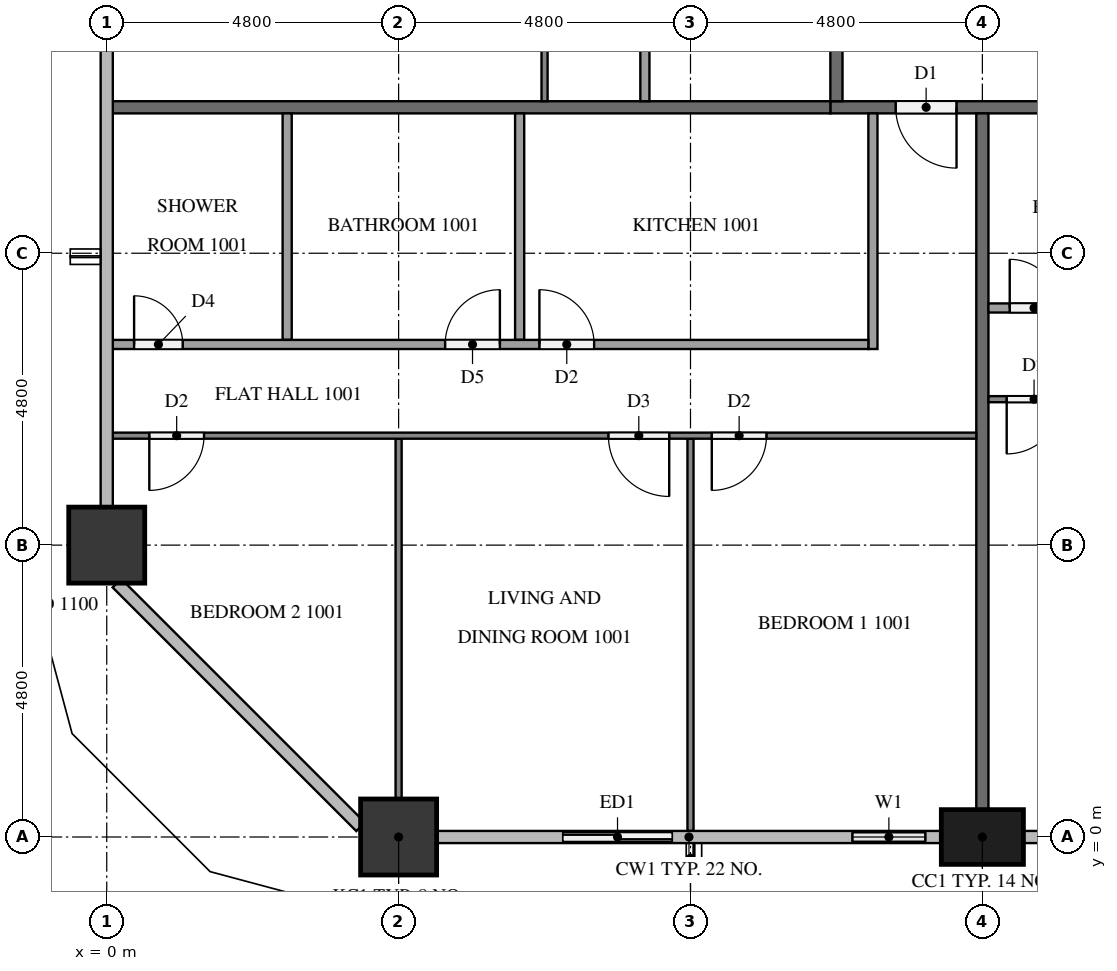
"""IFC4 building model, lengths in metres.
Left out: names, types, materials, properties, quantities, classifications, styles, units other than length and angle.
Written with IfcOpenShell. Run it as: python <this file> out.ifc"""

import sys

from ifc_helpers import new_model, si_unit, direction, frame, frame_2d, origin, origin_2d, place, context, subcontext, project, spatial, rectangle, extrude, element, fill, save


model = new_model("IFC4")
c1 = context("Model", 3, precision=1e-05, world=origin(), true_north=direction((0.0, 1.0)))
c2 = subcontext(c1, "Body", "Model", "MODEL_VIEW")
j1 = project(units=[si_unit("LENGTHUNIT", "METRE"), si_unit("PLANEANGLEUNIT", "RADIAN")], contexts=[c1])
p1 = place(None, origin())
s1 = spatial("IfcSite", under=j1, at=p1, CompositionType="ELEMENT")
p2 = place(p1, origin())
s2 = spatial("IfcBuilding", under=s1, at=p2, CompositionType="ELEMENT")
p3 = place(p2, frame((0.0, 0.0, 43.4)))
s3 = spatial("IfcBuildingStorey", under=s2, at=p3, CompositionType="ELEMENT", Elevation=43.4)
p4 = place(p3, frame((4.8, 0.0, 0.0), z_axis=(0.0, 0.0, 1.0), x_axis=(1.0, 0.0, 0.0)))
e1 = element("IfcColumn", 1, at=p4, inside=s3, PredefinedType="COLUMN", context=c2, shape_type="SweptSolid", body=[
    extrude(rectangle(XDim=1.25, YDim=1.25, at=origin_2d()), origin(), (0.0, 0.0, 1.0), 3.2),
])
p5 = place(p3, frame((14.4, 0.0, 0.0), z_axis=(0.0, 0.0, 1.0), x_axis=(1.0, 0.0, 0.0)))
e2 = element("IfcColumn", 2, at=p5, inside=s3, PredefinedType="COLUMN", context=c2, shape_type="SweptSolid", body=[
    extrude(rectangle(XDim=1.35, YDim=0.9, at=origin_2d()), origin(), (0.0, 0.0, 1.0), 3.2),
])
p6 = place(p3, frame((0.0, 4.8, 0.0), z_axis=(0.0, 0.0, 1.0), x_axis=(1.0, 0.0, 0.0)))
e3 = element("IfcColumn", 3, at=p6, inside=s3, PredefinedType="COLUMN", context=c2, shape_type="SweptSolid", body=[
    extrude(rectangle(XDim=1.25, YDim=1.25, at=origin_2d()), origin(), (0.0, 0.0, 1.0), 3.2),
])
p7 = place(p3, frame((7.2, 0.0, 0.0), z_axis=(0.0, 0.0, 1.0), x_axis=(1.0, 0.0, 0.0)))
e4 = element("IfcWall", 4, at=p7, inside=s3, PredefinedType="SOLIDWALL", context=c2, shape_type="SweptSolid", body=[
    extrude(rectangle(XDim=2.4, YDim=0.15, at=frame_2d((1.2, 0.0))), origin(), (0.0, 0.0, 1.0), 3.2),
])
p8 = place(p7, frame((0.3, 0.0, 0.0)))
e5 = element("IfcOpeningElement", 5, at=p8, cuts=e4, PredefinedType="OPENING", context=c2, shape_type="SweptSolid", body=[
    extrude(rectangle(XDim=1.8, YDim=2.4, at=frame_2d((0.9, 1.2))), frame((0.0, 0.085, 0.0), z_axis=(0.0, -1.0, 0.0), x_axis=(1.0, 0.0, 0.0)), (0.0, 0.0, 1.0), 0.17),
])
p9 = place(p3, frame((12.0, 0.0, 0.0), z_axis=(0.0, 0.0, 1.0), x_axis=(1.0, 0.0, 0.0)))
e6 = element("IfcWall", 6, at=p9, inside=s3, PredefinedType="SOLIDWALL", context=c2, shape_type="SweptSolid", body=[
    extrude(rectangle(XDim=1.725, YDim=0.15, at=frame_2d((0.863, 0.0))), origin(), (0.0, 0.0, 1.0), 3.2),
])
p10 = place(p9, frame((0.262, 0.0, 0.9)))
e7 = element("IfcOpeningElement", 7, at=p10, cuts=e6, PredefinedType="OPENING", context=c2, shape_type="SweptSolid", body=[
    extrude(rectangle(XDim=1.2, YDim=1.4, at=frame_2d((0.6, 0.7))), frame((0.0, 0.085, 0.0), z_axis=(0.0, -1.0, 0.0), x_axis=(1.0, 0.0, 0.0)), (0.0, 0.0, 1.0), 0.17),
])
p11 = place(p3, frame((15.075, 0.0, 0.0), z_axis=(0.0, 0.0, 1.0), x_axis=(1.0, 0.0, 0.0)))
e8 = element("IfcWall", 8, at=p11, inside=s3, PredefinedType="SOLIDWALL", context=c2, shape_type="SweptSolid", body=[
    extrude(rectangle(XDim=1.725, YDim=0.15, at=frame_2d((0.863, 0.0))), origin(), (0.0, 0.0, 1.0), 3.2),
])
p12 = place(p11, frame((0.262, 0.0, 0.9)))
e9 = element("IfcOpeningElement", 9, at=p12, cuts=e8, PredefinedType="OPENING", context=c2, shape_type="SweptSolid", body=[
    extrude(rectangle(XDim=1.2, YDim=1.4, at=frame_2d((0.6, 0.7))), frame((0.0, 0.085, 0.0), z_axis=(0.0, -1.0, 0.0), x_axis=(1.0, 0.0, 0.0)), (0.0, 0.0, 1.0), 0.17),
])
p13 = place(p3, frame((50.5, 12.0, 0.0), z_axis=(0.0, 0.0, 1.0), x_axis=(-1.0, 0.0, 0.0)))
e10 = element("IfcWall", 10, at=p13, inside=s3, PredefinedType="PARTITIONING", context=c2, shape_type="SweptSolid", body=[
    extrude(rectangle(XDim=38.6, YDim=0.2, at=frame_2d((19.3, 0.0))), origin(), (0.0, 0.0, 1.0), 3.2),
])
p14 = place(p13, frame((36.525, 0.0, 0.0)))
e11 = element("IfcOpeningElement", 11, at=p14, cuts=e10, PredefinedType="OPENING", context=c2, shape_type="SweptSolid", body=[
    extrude(rectangle(XDim=1.0, YDim=2.1, at=frame_2d((0.5, 1.05))), frame((0.0, 0.11, 0.0), z_axis=(0.0, -1.0, 0.0), x_axis=(1.0, 0.0, 0.0)), (0.0, 0.0, 1.0), 0.22),
])
p15 = place(p13, frame((24.525, 0.0, 0.0)))
e12 = element("IfcOpeningElement", 12, at=p15, cuts=e10, PredefinedType="OPENING", context=c2, shape_type="SweptSolid", body=[
    extrude(rectangle(XDim=1.0, YDim=2.1, at=frame_2d((0.5, 1.05))), frame((0.0, 0.11, 0.0), z_axis=(0.0, -1.0, 0.0), x_axis=(1.0, 0.0, 0.0)), (0.0, 0.0, 1.0), 0.22),
])
p16 = place(p13, frame((22.675, 0.0, 0.0)))
e13 = element("IfcOpeningElement", 13, at=p16, cuts=e10, PredefinedType="OPENING", context=c2, shape_type="SweptSolid", body=[
    extrude(rectangle(XDim=1.0, YDim=2.1, at=frame_2d((0.5, 1.05))), frame((0.0, 0.11, 0.0), z_axis=(0.0, -1.0, 0.0), x_axis=(1.0, 0.0, 0.0)), (0.0, 0.0, 1.0), 0.22),
])
p17 = place(p13, frame((8.275, 0.0, 0.0)))
e14 = element("IfcOpeningElement", 14, at=p17, cuts=e10, PredefinedType="OPENING", context=c2, shape_type="SweptSolid", body=[
    extrude(rectangle(XDim=1.0, YDim=2.1, at=frame_2d((0.5, 1.05))), frame((0.0, 0.11, 0.0), z_axis=(0.0, -1.0, 0.0), x_axis=(1.0, 0.0, 0.0)), (0.0, 0.0, 1.0), 0.22),
])
p18 = place(p3, frame((12.0, 12.1, 0.0), z_axis=(0.0, 0.0, 1.0), x_axis=(0.0, 1.0, 0.0)))
e15 = element("IfcWall", 15, at=p18, inside=s3, PredefinedType="PARTITIONING", context=c2, shape_type="SweptSolid", body=[
    extrude(rectangle(XDim=28.6, YDim=0.2, at=frame_2d((14.3, 0.0))), origin(), (0.0, 0.0, 1.0), 3.2),
])
p19 = place(p18, frame((26.725, 0.0, 0.0)))
e16 = element("IfcOpeningElement", 16, at=p19, cuts=e15, PredefinedType="OPENING", context=c2, shape_type="SweptSolid", body=[
    extrude(rectangle(XDim=1.0, YDim=2.1, at=frame_2d((0.5, 1.05))), frame((0.0, 0.11, 0.0), z_axis=(0.0, -1.0, 0.0), x_axis=(1.0, 0.0, 0.0)), (0.0, 0.0, 1.0), 0.22),
])
p20 = place(p18, frame((17.125, 0.0, 0.0)))
e17 = element("IfcOpeningElement", 17, at=p20, cuts=e15, PredefinedType="OPENING", context=c2, shape_type="SweptSolid", body=[
    extrude(rectangle(XDim=1.0, YDim=2.1, at=frame_2d((0.5, 1.05))), frame((0.0, 0.11, 0.0), z_axis=(0.0, -1.0, 0.0), x_axis=(1.0, 0.0, 0.0)), (0.0, 0.0, 1.0), 0.22),
])
p21 = place(p18, frame((15.275, 0.0, 0.0)))
e18 = element("IfcOpeningElement", 18, at=p21, cuts=e15, PredefinedType="OPENING", context=c2, shape_type="SweptSolid", body=[
    extrude(rectangle(XDim=1.0, YDim=2.1, at=frame_2d((0.5, 1.05))), frame((0.0, 0.11, 0.0), z_axis=(0.0, -1.0, 0.0), x_axis=(1.0, 0.0, 0.0)), (0.0, 0.0, 1.0), 0.22),
])
p22 = place(p18, frame((5.675, 0.0, 0.0)))
e19 = element("IfcOpeningElement", 19, at=p22, cuts=e15, PredefinedType="OPENING", context=c2, shape_type="SweptSolid", body=[
    extrude(rectangle(XDim=1.0, YDim=2.1, at=frame_2d((0.5, 1.05))), frame((0.0, 0.11, 0.0), z_axis=(0.0, -1.0, 0.0), x_axis=(1.0, 0.0, 0.0)), (0.0, 0.0, 1.0), 0.22),
])
p23 = place(p3, frame((14.4, 11.9, 0.0), z_axis=(0.0, 0.0, 1.0), x_axis=(0.0, -1.0, 0.0)))
e20 = element("IfcWall", 20, at=p23, inside=s3, PredefinedType="PARTITIONING", context=c2, shape_type="SweptSolid", body=[
    extrude(rectangle(XDim=11.45, YDim=0.2, at=frame_2d((5.725, 0.0))), origin(), (0.0, 0.0, 1.0), 3.2),
])
p24 = place(p3, frame((0.1, 12.0, 0.0), z_axis=(0.0, 0.0, 1.0), x_axis=(1.0, 0.0, 0.0)))
e21 = element("IfcWall", 21, at=p24, inside=s3, PredefinedType="PARTITIONING", context=c2, shape_type="SweptSolid", body=[
    extrude(rectangle(XDim=11.8, YDim=0.2, at=frame_2d((5.9, 0.0))), origin(), (0.0, 0.0, 1.0), 3.2),
])
p25 = place(p3, frame((9.6, 6.55, 0.0), z_axis=(0.0, 0.0, 1.0), x_axis=(0.0, -1.0, 0.0)))
e22 = element("IfcWall", 22, at=p25, inside=s3, PredefinedType="PARTITIONING", context=c2, shape_type="SweptSolid", body=[
    extrude(rectangle(XDim=6.45, YDim=0.1, at=frame_2d((3.225, 0.0))), origin(), (0.0, 0.0, 1.0), 3.2),
])
p26 = place(p3, frame((4.8, 6.55, 0.0), z_axis=(0.0, 0.0, 1.0), x_axis=(0.0, -1.0, 0.0)))
e23 = element("IfcWall", 23, at=p26, inside=s3, PredefinedType="PARTITIONING", context=c2, shape_type="SweptSolid", body=[
    extrude(rectangle(XDim=5.925, YDim=0.1, at=frame_2d((2.962, 0.0))), origin(), (0.0, 0.0, 1.0), 3.2),
])
p27 = place(p3, frame((14.3, 6.6, 0.0), z_axis=(0.0, 0.0, 1.0), x_axis=(-1.0, 0.0, 0.0)))
e24 = element("IfcWall", 24, at=p27, inside=s3, PredefinedType="PARTITIONING", context=c2, shape_type="SweptSolid", body=[
    extrude(rectangle(XDim=14.2, YDim=0.1, at=frame_2d((7.1, 0.0))), origin(), (0.0, 0.0, 1.0), 3.2),
])
p28 = place(p27, frame((3.45, 0.0, 0.0)))
e25 = element("IfcOpeningElement", 25, at=p28, cuts=e24, PredefinedType="OPENING", context=c2, shape_type="SweptSolid", body=[
    extrude(rectangle(XDim=0.9, YDim=2.1, at=frame_2d((0.45, 1.05))), frame((0.0, 0.06, 0.0), z_axis=(0.0, -1.0, 0.0), x_axis=(1.0, 0.0, 0.0)), (0.0, 0.0, 1.0), 0.12),
])
p29 = place(p27, frame((5.05, 0.0, 0.0)))
e26 = element("IfcOpeningElement", 26, at=p29, cuts=e24, PredefinedType="OPENING", context=c2, shape_type="SweptSolid", body=[
    extrude(rectangle(XDim=1.0, YDim=2.1, at=frame_2d((0.5, 1.05))), frame((0.0, 0.06, 0.0), z_axis=(0.0, -1.0, 0.0), x_axis=(1.0, 0.0, 0.0)), (0.0, 0.0, 1.0), 0.12),
])
p30 = place(p27, frame((12.7, 0.0, 0.0)))
e27 = element("IfcOpeningElement", 27, at=p30, cuts=e24, PredefinedType="OPENING", context=c2, shape_type="SweptSolid", body=[
    extrude(rectangle(XDim=0.9, YDim=2.1, at=frame_2d((0.45, 1.05))), frame((0.0, 0.06, 0.0), z_axis=(0.0, -1.0, 0.0), x_axis=(1.0, 0.0, 0.0)), (0.0, 0.0, 1.0), 0.12),
])
for number, where, z_axis, x_axis in (
    (28, (6.79, 11.9, 0.0), (0.0, 0.0, 1.0), (0.0, -1.0, 0.0)),
    (29, (2.967, 11.9, 0.0), (0.0, 0.0, 1.0), (0.0, -1.0, 0.0)),
):
    element("IfcWall", number, at=place(p3, frame(where, z_axis=z_axis, x_axis=x_axis)), inside=s3, PredefinedType="PARTITIONING", context=c2, shape_type="SweptSolid", body=[
        extrude(rectangle(XDim=3.725, YDim=0.15, at=frame_2d((1.862, 0.0))), origin(), (0.0, 0.0, 1.0), 3.2),
    ])
p31 = place(p3, frame((12.6, 11.9, 0.0), z_axis=(0.0, 0.0, 1.0), x_axis=(0.0, -1.0, 0.0)))
e30 = element("IfcWall", 30, at=p31, inside=s3, PredefinedType="PARTITIONING", context=c2, shape_type="SweptSolid", body=[
    extrude(rectangle(XDim=3.875, YDim=0.15, at=frame_2d((1.938, 0.0))), origin(), (0.0, 0.0, 1.0), 3.2),
])
p32 = place(p3, frame((0.1, 8.1, 0.0), z_axis=(0.0, 0.0, 1.0), x_axis=(1.0, 0.0, 0.0)))
e31 = element("IfcWall", 31, at=p32, inside=s3, PredefinedType="PARTITIONING", context=c2, shape_type="SweptSolid", body=[
    extrude(rectangle(XDim=12.425, YDim=0.15, at=frame_2d((6.212, 0.0))), origin(), (0.0, 0.0, 1.0), 3.2),
])
p33 = place(p32, frame((7.015, 0.0, 0.0)))
e32 = element("IfcOpeningElement", 32, at=p33, cuts=e31, PredefinedType="OPENING", context=c2, shape_type="SweptSolid", body=[
    extrude(rectangle(XDim=0.9, YDim=2.1, at=frame_2d((0.45, 1.05))), frame((0.0, 0.085, 0.0), z_axis=(0.0, -1.0, 0.0), x_axis=(1.0, 0.0, 0.0)), (0.0, 0.0, 1.0), 0.17),
])
p34 = place(p32, frame((5.465, 0.0, 0.0)))
e33 = element("IfcOpeningElement", 33, at=p34, cuts=e31, PredefinedType="OPENING", context=c2, shape_type="SweptSolid", body=[
    extrude(rectangle(XDim=0.9, YDim=2.1, at=frame_2d((0.45, 1.05))), frame((0.0, 0.085, 0.0), z_axis=(0.0, -1.0, 0.0), x_axis=(1.0, 0.0, 0.0)), (0.0, 0.0, 1.0), 0.17),
])
p35 = place(p32, frame((0.35, 0.0, 0.0)))
e34 = element("IfcOpeningElement", 34, at=p35, cuts=e31, PredefinedType="OPENING", context=c2, shape_type="SweptSolid", body=[
    extrude(rectangle(XDim=0.8, YDim=2.1, at=frame_2d((0.4, 1.05))), frame((0.0, 0.085, 0.0), z_axis=(0.0, -1.0, 0.0), x_axis=(1.0, 0.0, 0.0)), (0.0, 0.0, 1.0), 0.17),
])
p36 = place(p3, frame((26.3, 7.2, 0.0), z_axis=(0.0, 0.0, 1.0), x_axis=(-1.0, 0.0, 0.0)))
e35 = element("IfcWall", 35, at=p36, inside=s3, PredefinedType="PARTITIONING", context=c2, shape_type="SweptSolid", body=[
    extrude(rectangle(XDim=11.8, YDim=0.1, at=frame_2d((5.9, 0.0))), origin(), (0.0, 0.0, 1.0), 3.2),
])
p37 = place(p36, frame((0.3, 0.0, 0.0)))
e36 = element("IfcOpeningElement", 36, at=p37, cuts=e35, PredefinedType="OPENING", context=c2, shape_type="SweptSolid", body=[
    extrude(rectangle(XDim=1.0, YDim=2.1, at=frame_2d((0.5, 1.05))), frame((0.0, 0.06, 0.0), z_axis=(0.0, -1.0, 0.0), x_axis=(1.0, 0.0, 0.0)), (0.0, 0.0, 1.0), 0.12),
])
p38 = place(p36, frame((10.6, 0.0, 0.0)))
e37 = element("IfcOpeningElement", 37, at=p38, cuts=e35, PredefinedType="OPENING", context=c2, shape_type="SweptSolid", body=[
    extrude(rectangle(XDim=0.9, YDim=2.1, at=frame_2d((0.45, 1.05))), frame((0.0, 0.06, 0.0), z_axis=(0.0, -1.0, 0.0), x_axis=(1.0, 0.0, 0.0)), (0.0, 0.0, 1.0), 0.12),
])
p39 = place(p3, frame((14.5, 8.7, 0.0), z_axis=(0.0, 0.0, 1.0), x_axis=(1.0, 0.0, 0.0)))
e38 = element("IfcWall", 38, at=p39, inside=s3, PredefinedType="PARTITIONING", context=c2, shape_type="SweptSolid", body=[
    extrude(rectangle(XDim=10.025, YDim=0.15, at=frame_2d((5.012, 0.0))), origin(), (0.0, 0.0, 1.0), 3.2),
])
p40 = place(p39, frame((8.825, 0.0, 0.0)))
e39 = element("IfcOpeningElement", 39, at=p40, cuts=e38, PredefinedType="OPENING", context=c2, shape_type="SweptSolid", body=[
    extrude(rectangle(XDim=0.9, YDim=2.1, at=frame_2d((0.45, 1.05))), frame((0.0, 0.085, 0.0), z_axis=(0.0, -1.0, 0.0), x_axis=(1.0, 0.0, 0.0)), (0.0, 0.0, 1.0), 0.17),
])
p41 = place(p39, frame((0.35, 0.0, 0.0)))
e40 = element("IfcOpeningElement", 40, at=p41, cuts=e38, PredefinedType="OPENING", context=c2, shape_type="SweptSolid", body=[
    extrude(rectangle(XDim=0.8, YDim=2.1, at=frame_2d((0.4, 1.05))), frame((0.0, 0.085, 0.0), z_axis=(0.0, -1.0, 0.0), x_axis=(1.0, 0.0, 0.0)), (0.0, 0.0, 1.0), 0.17),
])
p42 = place(p3, frame((7.2, 12.1, 0.0), z_axis=(0.0, 0.0, 1.0), x_axis=(0.0, 1.0, 0.0)))
e41 = element("IfcWall", 41, at=p42, inside=s3, PredefinedType="PARTITIONING", context=c2, shape_type="SweptSolid", body=[
    extrude(rectangle(XDim=7.0, YDim=0.1, at=frame_2d((3.5, 0.0))), origin(), (0.0, 0.0, 1.0), 3.2),
])
p43 = place(p42, frame((5.7, 0.0, 0.0)))
e42 = element("IfcOpeningElement", 42, at=p43, cuts=e41, PredefinedType="OPENING", context=c2, shape_type="SweptSolid", body=[
    extrude(rectangle(XDim=1.0, YDim=2.1, at=frame_2d((0.5, 1.05))), frame((0.0, 0.06, 0.0), z_axis=(0.0, -1.0, 0.0), x_axis=(1.0, 0.0, 0.0)), (0.0, 0.0, 1.0), 0.12),
])
p44 = place(p3, frame((8.85, 17.325, 0.0), z_axis=(0.0, 0.0, 1.0), x_axis=(0.0, -1.0, 0.0)))
e43 = element("IfcWall", 43, at=p44, inside=s3, PredefinedType="PARTITIONING", context=c2, shape_type="SweptSolid", body=[
    extrude(rectangle(XDim=5.225, YDim=0.15, at=frame_2d((2.612, 0.0))), origin(), (0.0, 0.0, 1.0), 3.2),
])
p45 = place(p44, frame((0.965, 0.0, 0.0)))
e44 = element("IfcOpeningElement", 44, at=p45, cuts=e43, PredefinedType="OPENING", context=c2, shape_type="SweptSolid", body=[
    extrude(rectangle(XDim=0.8, YDim=2.1, at=frame_2d((0.4, 1.05))), frame((0.0, 0.085, 0.0), z_axis=(0.0, -1.0, 0.0), x_axis=(1.0, 0.0, 0.0)), (0.0, 0.0, 1.0), 0.17),
])
p46 = place(p44, frame((2.415, 0.0, 0.0)))
e45 = element("IfcOpeningElement", 45, at=p46, cuts=e43, PredefinedType="OPENING", context=c2, shape_type="SweptSolid", body=[
    extrude(rectangle(XDim=0.9, YDim=2.1, at=frame_2d((0.45, 1.05))), frame((0.0, 0.085, 0.0), z_axis=(0.0, -1.0, 0.0), x_axis=(1.0, 0.0, 0.0)), (0.0, 0.0, 1.0), 0.17),
])
p47 = place(p8, origin())
e46 = element("IfcDoor", 46, at=p47, inside=s3, OperationType="SLIDING_TO_LEFT", PredefinedType="DOOR", context=c2, shape_type="SweptSolid", body=[
    extrude(rectangle(XDim=1.8, YDim=2.4, at=frame_2d((0.9, 1.2))), frame((0.0, 0.025, 0.0), z_axis=(0.0, -1.0, 0.0), x_axis=(1.0, 0.0, 0.0)), (0.0, 0.0, 1.0), 0.05),
])
fill(e5, e46)
p48 = place(p10, origin())
e47 = element("IfcWindow", 47, at=p48, inside=s3, PartitioningType="SINGLE_PANEL", PredefinedType="WINDOW", context=c2, shape_type="SweptSolid", body=[
    extrude(rectangle(XDim=1.2, YDim=1.4, at=frame_2d((0.6, 0.7))), frame((0.0, 0.03, 0.0), z_axis=(0.0, -1.0, 0.0), x_axis=(1.0, 0.0, 0.0)), (0.0, 0.0, 1.0), 0.06),
])
fill(e7, e47)
p49 = place(p14, origin())
e48 = element("IfcDoor", 48, at=p49, inside=s3, OperationType="SINGLE_SWING_LEFT", PredefinedType="DOOR", context=c2, shape_type="SweptSolid", body=[
    extrude(rectangle(XDim=1.0, YDim=2.1, at=frame_2d((0.5, 1.05))), frame((0.0, 0.025, 0.0), z_axis=(0.0, -1.0, 0.0), x_axis=(1.0, 0.0, 0.0)), (0.0, 0.0, 1.0), 0.05),
])
fill(e11, e48)
p50 = place(p28, origin())
e49 = element("IfcDoor", 49, at=p50, inside=s3, OperationType="SINGLE_SWING_RIGHT", PredefinedType="DOOR", context=c2, shape_type="SweptSolid", body=[
    extrude(rectangle(XDim=0.9, YDim=2.1, at=frame_2d((0.45, 1.05))), frame((0.0, 0.025, 0.0), z_axis=(0.0, -1.0, 0.0), x_axis=(1.0, 0.0, 0.0)), (0.0, 0.0, 1.0), 0.05),
])
fill(e25, e49)
p51 = place(p29, origin())
e50 = element("IfcDoor", 50, at=p51, inside=s3, OperationType="SINGLE_SWING_LEFT", PredefinedType="DOOR", context=c2, shape_type="SweptSolid", body=[
    extrude(rectangle(XDim=1.0, YDim=2.1, at=frame_2d((0.5, 1.05))), frame((0.0, 0.025, 0.0), z_axis=(0.0, -1.0, 0.0), x_axis=(1.0, 0.0, 0.0)), (0.0, 0.0, 1.0), 0.05),
])
fill(e26, e50)
p52 = place(p30, origin())
e51 = element("IfcDoor", 51, at=p52, inside=s3, OperationType="SINGLE_SWING_RIGHT", PredefinedType="DOOR", context=c2, shape_type="SweptSolid", body=[
    extrude(rectangle(XDim=0.9, YDim=2.1, at=frame_2d((0.45, 1.05))), frame((0.0, 0.025, 0.0), z_axis=(0.0, -1.0, 0.0), x_axis=(1.0, 0.0, 0.0)), (0.0, 0.0, 1.0), 0.05),
])
fill(e27, e51)
p53 = place(p33, origin())
e52 = element("IfcDoor", 52, at=p53, inside=s3, OperationType="SINGLE_SWING_LEFT", PredefinedType="DOOR", context=c2, shape_type="SweptSolid", body=[
    extrude(rectangle(XDim=0.9, YDim=2.1, at=frame_2d((0.45, 1.05))), frame((0.0, 0.025, 0.0), z_axis=(0.0, -1.0, 0.0), x_axis=(1.0, 0.0, 0.0)), (0.0, 0.0, 1.0), 0.05),
])
fill(e32, e52)
p54 = place(p34, origin())
e53 = element("IfcDoor", 53, at=p54, inside=s3, OperationType="SINGLE_SWING_RIGHT", PredefinedType="DOOR", context=c2, shape_type="SweptSolid", body=[
    extrude(rectangle(XDim=0.9, YDim=2.1, at=frame_2d((0.45, 1.05))), frame((0.0, 0.025, 0.0), z_axis=(0.0, -1.0, 0.0), x_axis=(1.0, 0.0, 0.0)), (0.0, 0.0, 1.0), 0.05),
])
fill(e33, e53)
p55 = place(p35, origin())
e54 = element("IfcDoor", 54, at=p55, inside=s3, OperationType="SINGLE_SWING_LEFT", PredefinedType="DOOR", context=c2, shape_type="SweptSolid", body=[
    extrude(rectangle(XDim=0.8, YDim=2.1, at=frame_2d((0.4, 1.05))), frame((0.0, 0.025, 0.0), z_axis=(0.0, -1.0, 0.0), x_axis=(1.0, 0.0, 0.0)), (0.0, 0.0, 1.0), 0.05),
])
fill(e34, e54)
p56 = place(p38, origin())
e55 = element("IfcDoor", 55, at=p56, inside=s3, OperationType="SINGLE_SWING_RIGHT", PredefinedType="DOOR", context=c2, shape_type="SweptSolid", body=[
    extrude(rectangle(XDim=0.9, YDim=2.1, at=frame_2d((0.45, 1.05))), frame((0.0, 0.025, 0.0), z_axis=(0.0, -1.0, 0.0), x_axis=(1.0, 0.0, 0.0)), (0.0, 0.0, 1.0), 0.05),
])
fill(e37, e55)
p57 = place(p41, origin())
e56 = element("IfcDoor", 56, at=p57, inside=s3, OperationType="SINGLE_SWING_LEFT", PredefinedType="DOOR", context=c2, shape_type="SweptSolid", body=[
    extrude(rectangle(XDim=0.8, YDim=2.1, at=frame_2d((0.4, 1.05))), frame((0.0, 0.025, 0.0), z_axis=(0.0, -1.0, 0.0), x_axis=(1.0, 0.0, 0.0)), (0.0, 0.0, 1.0), 0.05),
])
fill(e40, e56)
save(model, sys.argv[1])
